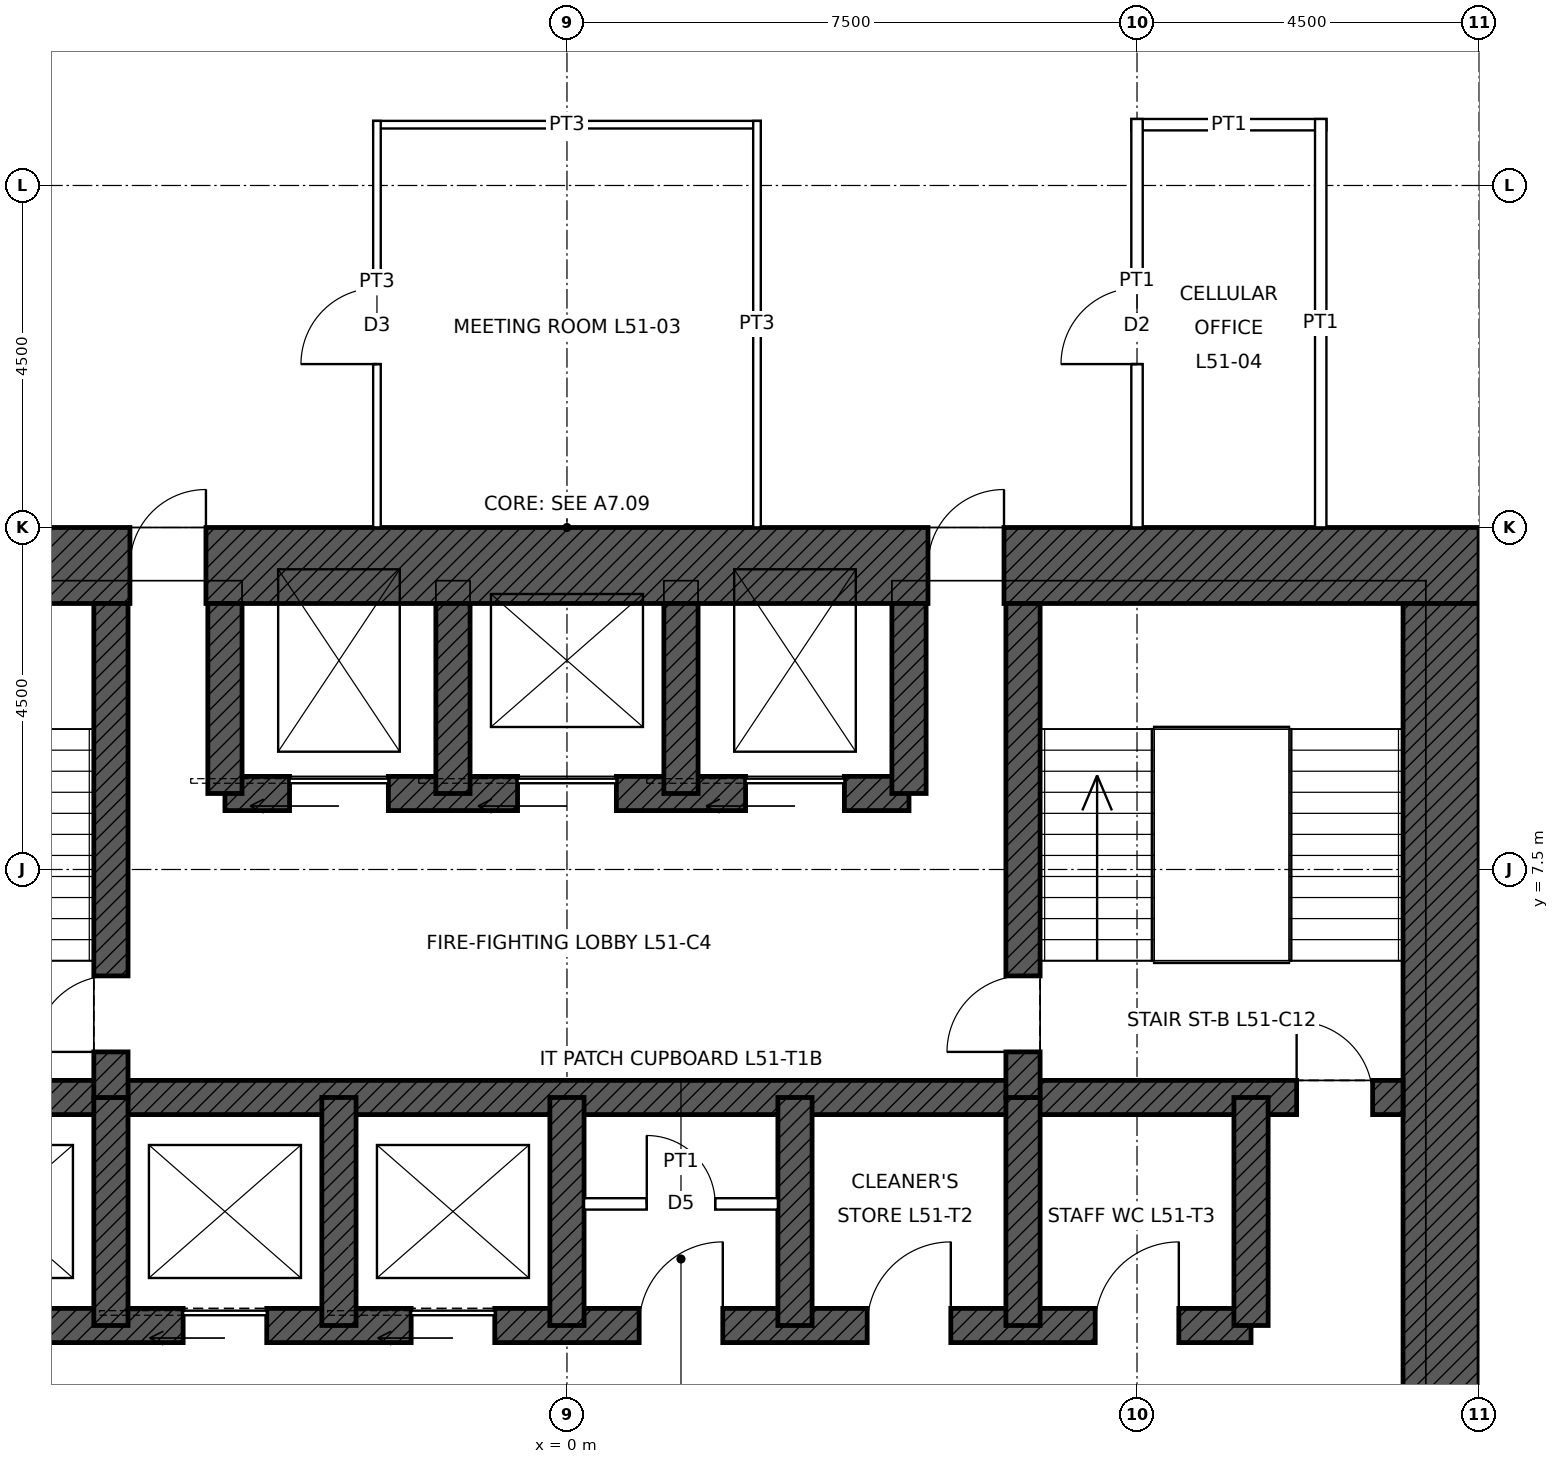
"""IFC4 building model, lengths in metres.
Left out: names, types, materials, properties, quantities, classifications, styles, units other than length and angle.
Written with IfcOpenShell. Run it as: python <this file> out.ifc"""

import sys

from ifc_helpers import new_model, si_unit, direction, frame, frame_2d, origin, place, context, subcontext, project, spatial, rectangle, extrude, element, fill, save


model = new_model("IFC4")
c1 = context("Model", 3, precision=1e-05, world=origin(), true_north=direction((0.0, 1.0)))
c2 = subcontext(c1, "Body", "Model", "MODEL_VIEW")
j1 = project(units=[si_unit("LENGTHUNIT", "METRE"), si_unit("PLANEANGLEUNIT", "RADIAN")], contexts=[c1])
p1 = place(None, origin())
s1 = spatial("IfcSite", under=j1, at=p1, CompositionType="ELEMENT")
p2 = place(p1, origin())
s2 = spatial("IfcBuilding", under=s1, at=p2, CompositionType="ELEMENT")
p3 = place(p2, frame((0.0, 0.0, 237.9)))
s3 = spatial("IfcBuildingStorey", under=s2, at=p3, CompositionType="ELEMENT", Elevation=237.9)
p4 = place(p3, frame((-12.0, 11.5, 0.0), z_axis=(0.0, 0.0, 1.0), x_axis=(1.0, 0.0, 0.0)))
e1 = element("IfcWall", 1, at=p4, inside=s3, PredefinedType="SHEAR", context=c2, shape_type="SweptSolid", body=[
    extrude(rectangle(XDim=24.0, YDim=1.0, at=frame_2d((12.0, 0.0))), origin(), (0.0, 0.0, 1.0), 4.0),
])
p5 = place(p4, frame((6.25, 0.0, 0.0)))
e2 = element("IfcOpeningElement", 2, at=p5, cuts=e1, PredefinedType="OPENING", context=c2, shape_type="SweptSolid", body=[
    extrude(rectangle(XDim=1.0, YDim=2.4, at=frame_2d((0.5, 1.2))), frame((0.0, 0.51, 0.0), z_axis=(0.0, -1.0, 0.0), x_axis=(1.0, 0.0, 0.0)), (0.0, 0.0, 1.0), 1.02),
])
p6 = place(p4, frame((16.75, 0.0, 0.0)))
e3 = element("IfcOpeningElement", 3, at=p6, cuts=e1, PredefinedType="OPENING", context=c2, shape_type="SweptSolid", body=[
    extrude(rectangle(XDim=1.0, YDim=2.4, at=frame_2d((0.5, 1.2))), frame((0.0, 0.51, 0.0), z_axis=(0.0, -1.0, 0.0), x_axis=(1.0, 0.0, 0.0)), (0.0, 0.0, 1.0), 1.02),
])
p7 = place(p3, frame((11.5, 11.0, 0.0), z_axis=(0.0, 0.0, 1.0), x_axis=(0.0, -1.0, 0.0)))
e4 = element("IfcWall", 4, at=p7, inside=s3, PredefinedType="SHEAR", context=c2, shape_type="SweptSolid", body=[
    extrude(rectangle(XDim=22.0, YDim=1.0, at=frame_2d((11.0, 0.0))), origin(), (0.0, 0.0, 1.0), 4.0),
])
p8 = place(p7, frame((10.5, 0.0, 0.0)))
e5 = element("IfcOpeningElement", 5, at=p8, cuts=e4, PredefinedType="OPENING", context=c2, shape_type="SweptSolid", body=[
    extrude(rectangle(XDim=1.0, YDim=2.4, at=frame_2d((0.5, 1.2))), frame((0.0, 0.51, 0.0), z_axis=(0.0, -1.0, 0.0), x_axis=(1.0, 0.0, 0.0)), (0.0, 0.0, 1.0), 1.02),
])
p9 = place(p3, frame((-11.0, 4.5, 0.0), z_axis=(0.0, 0.0, 1.0), x_axis=(1.0, 0.0, 0.0)))
e6 = element("IfcWall", 6, at=p9, inside=s3, PredefinedType="SHEAR", context=c2, shape_type="SweptSolid", body=[
    extrude(rectangle(XDim=22.0, YDim=0.45, at=frame_2d((11.0, 0.0))), origin(), (0.0, 0.0, 1.0), 4.0),
])
p10 = place(p9, frame((0.4, 0.0, 0.0)))
e7 = element("IfcOpeningElement", 7, at=p10, cuts=e6, PredefinedType="OPENING", context=c2, shape_type="SweptSolid", body=[
    extrude(rectangle(XDim=1.0, YDim=2.1, at=frame_2d((0.5, 1.05))), frame((0.0, 0.235, 0.0), z_axis=(0.0, -1.0, 0.0), x_axis=(1.0, 0.0, 0.0)), (0.0, 0.0, 1.0), 0.47),
])
p11 = place(p9, frame((20.6, 0.0, 0.0)))
e8 = element("IfcOpeningElement", 8, at=p11, cuts=e6, PredefinedType="OPENING", context=c2, shape_type="SweptSolid", body=[
    extrude(rectangle(XDim=1.0, YDim=2.1, at=frame_2d((0.5, 1.05))), frame((0.0, 0.235, 0.0), z_axis=(0.0, -1.0, 0.0), x_axis=(1.0, 0.0, 0.0)), (0.0, 0.0, 1.0), 0.47),
])
p12 = place(p3, frame((-9.0, 1.5, 0.0), z_axis=(0.0, 0.0, 1.0), x_axis=(1.0, 0.0, 0.0)))
e9 = element("IfcWall", 9, at=p12, inside=s3, PredefinedType="SHEAR", context=c2, shape_type="SweptSolid", body=[
    extrude(rectangle(XDim=18.0, YDim=0.45, at=frame_2d((9.0, 0.0))), origin(), (0.0, 0.0, 1.0), 4.0),
])
p13 = place(p12, frame((0.95, 0.0, 0.0)))
e10 = element("IfcOpeningElement", 10, at=p13, cuts=e9, PredefinedType="OPENING", context=c2, shape_type="SweptSolid", body=[
    extrude(rectangle(XDim=1.1, YDim=2.1, at=frame_2d((0.55, 1.05))), frame((0.0, 0.235, 0.0), z_axis=(0.0, -1.0, 0.0), x_axis=(1.0, 0.0, 0.0)), (0.0, 0.0, 1.0), 0.47),
])
p14 = place(p12, frame((3.95, 0.0, 0.0)))
e11 = element("IfcOpeningElement", 11, at=p14, cuts=e9, PredefinedType="OPENING", context=c2, shape_type="SweptSolid", body=[
    extrude(rectangle(XDim=1.1, YDim=2.1, at=frame_2d((0.55, 1.05))), frame((0.0, 0.235, 0.0), z_axis=(0.0, -1.0, 0.0), x_axis=(1.0, 0.0, 0.0)), (0.0, 0.0, 1.0), 0.47),
])
p15 = place(p12, frame((6.95, 0.0, 0.0)))
e12 = element("IfcOpeningElement", 12, at=p15, cuts=e9, PredefinedType="OPENING", context=c2, shape_type="SweptSolid", body=[
    extrude(rectangle(XDim=1.1, YDim=2.1, at=frame_2d((0.55, 1.05))), frame((0.0, 0.235, 0.0), z_axis=(0.0, -1.0, 0.0), x_axis=(1.0, 0.0, 0.0)), (0.0, 0.0, 1.0), 0.47),
])
p16 = place(p12, frame((9.95, 0.0, 0.0)))
e13 = element("IfcOpeningElement", 13, at=p16, cuts=e9, PredefinedType="OPENING", context=c2, shape_type="SweptSolid", body=[
    extrude(rectangle(XDim=1.1, YDim=2.1, at=frame_2d((0.55, 1.05))), frame((0.0, 0.235, 0.0), z_axis=(0.0, -1.0, 0.0), x_axis=(1.0, 0.0, 0.0)), (0.0, 0.0, 1.0), 0.47),
])
p17 = place(p12, frame((12.95, 0.0, 0.0)))
e14 = element("IfcOpeningElement", 14, at=p17, cuts=e9, PredefinedType="OPENING", context=c2, shape_type="SweptSolid", body=[
    extrude(rectangle(XDim=1.1, YDim=2.1, at=frame_2d((0.55, 1.05))), frame((0.0, 0.235, 0.0), z_axis=(0.0, -1.0, 0.0), x_axis=(1.0, 0.0, 0.0)), (0.0, 0.0, 1.0), 0.47),
])
p18 = place(p12, frame((15.95, 0.0, 0.0)))
e15 = element("IfcOpeningElement", 15, at=p18, cuts=e9, PredefinedType="OPENING", context=c2, shape_type="SweptSolid", body=[
    extrude(rectangle(XDim=1.1, YDim=2.1, at=frame_2d((0.55, 1.05))), frame((0.0, 0.235, 0.0), z_axis=(0.0, -1.0, 0.0), x_axis=(1.0, 0.0, 0.0)), (0.0, 0.0, 1.0), 0.47),
])
p19 = place(p3, frame((-4.5, 8.5, 0.0), z_axis=(0.0, 0.0, 1.0), x_axis=(1.0, 0.0, 0.0)))
e16 = element("IfcWall", 16, at=p19, inside=s3, PredefinedType="SHEAR", context=c2, shape_type="SweptSolid", body=[
    extrude(rectangle(XDim=9.0, YDim=0.45, at=frame_2d((4.5, 0.0))), origin(), (0.0, 0.0, 1.0), 4.0),
])
p20 = place(p19, frame((0.85, 0.0, 0.0)))
e17 = element("IfcOpeningElement", 17, at=p20, cuts=e16, PredefinedType="OPENING", context=c2, shape_type="SweptSolid", body=[
    extrude(rectangle(XDim=1.3, YDim=2.4, at=frame_2d((0.65, 1.2))), frame((0.0, 0.235, 0.0), z_axis=(0.0, -1.0, 0.0), x_axis=(1.0, 0.0, 0.0)), (0.0, 0.0, 1.0), 0.47),
])
p21 = place(p19, frame((6.85, 0.0, 0.0)))
e18 = element("IfcOpeningElement", 18, at=p21, cuts=e16, PredefinedType="OPENING", context=c2, shape_type="SweptSolid", body=[
    extrude(rectangle(XDim=1.3, YDim=2.4, at=frame_2d((0.65, 1.2))), frame((0.0, 0.235, 0.0), z_axis=(0.0, -1.0, 0.0), x_axis=(1.0, 0.0, 0.0)), (0.0, 0.0, 1.0), 0.47),
])
p22 = place(p19, frame((3.85, 0.0, 0.0)))
e19 = element("IfcOpeningElement", 19, at=p22, cuts=e16, PredefinedType="OPENING", context=c2, shape_type="SweptSolid", body=[
    extrude(rectangle(XDim=1.3, YDim=2.4, at=frame_2d((0.65, 1.2))), frame((0.0, 0.235, 0.0), z_axis=(0.0, -1.0, 0.0), x_axis=(1.0, 0.0, 0.0)), (0.0, 0.0, 1.0), 0.47),
])
for number, where, z_axis, x_axis in (
    (20, (9.0, 1.5, 0.0), (0.0, 0.0, 1.0), (0.0, 1.0, 0.0)),
    (21, (-6.0, 1.5, 0.0), (0.0, 0.0, 1.0), (0.0, 1.0, 0.0)),
    (22, (-3.0, 1.5, 0.0), (0.0, 0.0, 1.0), (0.0, 1.0, 0.0)),
    (23, (0.0, 1.5, 0.0), (0.0, 0.0, 1.0), (0.0, 1.0, 0.0)),
    (24, (3.0, 1.5, 0.0), (0.0, 0.0, 1.0), (0.0, 1.0, 0.0)),
    (25, (6.0, 1.5, 0.0), (0.0, 0.0, 1.0), (0.0, 1.0, 0.0)),
):
    element("IfcWall", number, at=place(p3, frame(where, z_axis=z_axis, x_axis=x_axis)), inside=s3, PredefinedType="SHEAR", context=c2, shape_type="SweptSolid", body=[
        extrude(rectangle(XDim=3.0, YDim=0.45, at=frame_2d((1.5, 0.0))), origin(), (0.0, 0.0, 1.0), 4.0),
    ])
p23 = place(p3, frame((-6.0, 4.5, 0.0), z_axis=(0.0, 0.0, 1.0), x_axis=(0.0, 1.0, 0.0)))
e26 = element("IfcWall", 26, at=p23, inside=s3, PredefinedType="SHEAR", context=c2, shape_type="SweptSolid", body=[
    extrude(rectangle(XDim=6.5, YDim=0.45, at=frame_2d((3.25, 0.0))), origin(), (0.0, 0.0, 1.0), 4.0),
])
p24 = place(p23, frame((0.6, 0.0, 0.0)))
e27 = element("IfcOpeningElement", 27, at=p24, cuts=e26, PredefinedType="OPENING", context=c2, shape_type="SweptSolid", body=[
    extrude(rectangle(XDim=1.0, YDim=2.1, at=frame_2d((0.5, 1.05))), frame((0.0, 0.235, 0.0), z_axis=(0.0, -1.0, 0.0), x_axis=(1.0, 0.0, 0.0)), (0.0, 0.0, 1.0), 0.47),
])
p25 = place(p3, frame((6.0, 4.5, 0.0), z_axis=(0.0, 0.0, 1.0), x_axis=(0.0, 1.0, 0.0)))
e28 = element("IfcWall", 28, at=p25, inside=s3, PredefinedType="SHEAR", context=c2, shape_type="SweptSolid", body=[
    extrude(rectangle(XDim=6.5, YDim=0.45, at=frame_2d((3.25, 0.0))), origin(), (0.0, 0.0, 1.0), 4.0),
])
p26 = place(p25, frame((0.6, 0.0, 0.0)))
e29 = element("IfcOpeningElement", 29, at=p26, cuts=e28, PredefinedType="OPENING", context=c2, shape_type="SweptSolid", body=[
    extrude(rectangle(XDim=1.0, YDim=2.1, at=frame_2d((0.5, 1.05))), frame((0.0, 0.235, 0.0), z_axis=(0.0, -1.0, 0.0), x_axis=(1.0, 0.0, 0.0)), (0.0, 0.0, 1.0), 0.47),
])
for number, where, z_axis, x_axis in (
    (30, (-4.5, 8.5, 0.0), (0.0, 0.0, 1.0), (0.0, 1.0, 0.0)),
    (31, (4.5, 8.5, 0.0), (0.0, 0.0, 1.0), (0.0, 1.0, 0.0)),
    (32, (-1.5, 8.5, 0.0), (0.0, 0.0, 1.0), (0.0, 1.0, 0.0)),
    (33, (1.5, 8.5, 0.0), (0.0, 0.0, 1.0), (0.0, 1.0, 0.0)),
):
    element("IfcWall", number, at=place(p3, frame(where, z_axis=z_axis, x_axis=x_axis)), inside=s3, PredefinedType="SHEAR", context=c2, shape_type="SweptSolid", body=[
        extrude(rectangle(XDim=2.5, YDim=0.45, at=frame_2d((1.25, 0.0))), origin(), (0.0, 0.0, 1.0), 4.0),
    ])
p27 = place(p3, frame((-2.55, 17.3, 0.0), z_axis=(0.0, 0.0, 1.0), x_axis=(1.0, 0.0, 0.0)))
e34 = element("IfcWall", 34, at=p27, inside=s3, PredefinedType="PARTITIONING", context=c2, shape_type="SweptSolid", body=[
    extrude(rectangle(XDim=5.1, YDim=0.1, at=frame_2d((2.55, 0.0))), origin(), (0.0, 0.0, 1.0), 3.85),
])
p28 = place(p3, frame((7.425, 17.3, 0.0), z_axis=(0.0, 0.0, 1.0), x_axis=(1.0, 0.0, 0.0)))
e35 = element("IfcWall", 35, at=p28, inside=s3, PredefinedType="PARTITIONING", context=c2, shape_type="SweptSolid", body=[
    extrude(rectangle(XDim=2.567, YDim=0.15, at=frame_2d((1.283, 0.0))), origin(), (0.0, 0.0, 1.0), 3.85),
])
p29 = place(p3, frame((-2.5, 12.0, 0.0), z_axis=(0.0, 0.0, 1.0), x_axis=(0.0, 1.0, 0.0)))
e36 = element("IfcWall", 36, at=p29, inside=s3, PredefinedType="PARTITIONING", context=c2, shape_type="SweptSolid", body=[
    extrude(rectangle(XDim=5.35, YDim=0.1, at=frame_2d((2.675, 0.0))), origin(), (0.0, 0.0, 1.0), 3.85),
])
p30 = place(p29, frame((2.15, 0.0, 0.0)))
e37 = element("IfcOpeningElement", 37, at=p30, cuts=e36, PredefinedType="OPENING", context=c2, shape_type="SweptSolid", body=[
    extrude(rectangle(XDim=1.0, YDim=2.1, at=frame_2d((0.5, 1.05))), frame((0.0, 0.06, 0.0), z_axis=(0.0, -1.0, 0.0), x_axis=(1.0, 0.0, 0.0)), (0.0, 0.0, 1.0), 0.12),
])
p31 = place(p3, frame((2.5, 12.0, 0.0), z_axis=(0.0, 0.0, 1.0), x_axis=(0.0, 1.0, 0.0)))
e38 = element("IfcWall", 38, at=p31, inside=s3, PredefinedType="PARTITIONING", context=c2, shape_type="SweptSolid", body=[
    extrude(rectangle(XDim=5.35, YDim=0.1, at=frame_2d((2.675, 0.0))), origin(), (0.0, 0.0, 1.0), 3.85),
])
p32 = place(p3, frame((7.5, 12.0, 0.0), z_axis=(0.0, 0.0, 1.0), x_axis=(0.0, 1.0, 0.0)))
e39 = element("IfcWall", 39, at=p32, inside=s3, PredefinedType="PARTITIONING", context=c2, shape_type="SweptSolid", body=[
    extrude(rectangle(XDim=5.375, YDim=0.15, at=frame_2d((2.688, 0.0))), origin(), (0.0, 0.0, 1.0), 3.238),
])
p33 = place(p32, frame((2.15, 0.0, 0.0)))
e40 = element("IfcOpeningElement", 40, at=p33, cuts=e39, PredefinedType="OPENING", context=c2, shape_type="SweptSolid", body=[
    extrude(rectangle(XDim=1.0, YDim=2.1, at=frame_2d((0.5, 1.05))), frame((0.0, 0.085, 0.0), z_axis=(0.0, -1.0, 0.0), x_axis=(1.0, 0.0, 0.0)), (0.0, 0.0, 1.0), 0.17),
])
p34 = place(p3, frame((9.917, 12.0, 0.0), z_axis=(0.0, 0.0, 1.0), x_axis=(0.0, 1.0, 0.0)))
e41 = element("IfcWall", 41, at=p34, inside=s3, PredefinedType="PARTITIONING", context=c2, shape_type="SweptSolid", body=[
    extrude(rectangle(XDim=5.375, YDim=0.15, at=frame_2d((2.688, 0.0))), origin(), (0.0, 0.0, 1.0), 3.85),
])
p35 = place(p3, frame((0.225, 3.1, 0.0), z_axis=(0.0, 0.0, 1.0), x_axis=(1.0, 0.0, 0.0)))
e42 = element("IfcWall", 42, at=p35, inside=s3, PredefinedType="PARTITIONING", context=c2, shape_type="SweptSolid", body=[
    extrude(rectangle(XDim=2.55, YDim=0.15, at=frame_2d((1.275, 0.0))), origin(), (0.0, 0.0, 1.0), 3.75),
])
p36 = place(p35, frame((0.825, 0.0, 0.0)))
e43 = element("IfcOpeningElement", 43, at=p36, cuts=e42, PredefinedType="OPENING", context=c2, shape_type="SweptSolid", body=[
    extrude(rectangle(XDim=0.9, YDim=2.1, at=frame_2d((0.45, 1.05))), frame((0.0, 0.085, 0.0), z_axis=(0.0, -1.0, 0.0), x_axis=(1.0, 0.0, 0.0)), (0.0, 0.0, 1.0), 0.17),
])
p37 = place(p11, origin())
e44 = element("IfcDoor", 44, at=p37, inside=s3, OperationType="SINGLE_SWING_LEFT", PredefinedType="DOOR", context=c2, shape_type="SweptSolid", body=[
    extrude(rectangle(XDim=1.0, YDim=2.1, at=frame_2d((0.5, 1.05))), frame((0.0, 0.025, 0.0), z_axis=(0.0, -1.0, 0.0), x_axis=(1.0, 0.0, 0.0)), (0.0, 0.0, 1.0), 0.05),
])
fill(e8, e44)
p38 = place(p24, origin())
e45 = element("IfcDoor", 45, at=p38, inside=s3, OperationType="SINGLE_SWING_LEFT", PredefinedType="DOOR", context=c2, shape_type="SweptSolid", body=[
    extrude(rectangle(XDim=1.0, YDim=2.1, at=frame_2d((0.5, 1.05))), frame((0.0, 0.025, 0.0), z_axis=(0.0, -1.0, 0.0), x_axis=(1.0, 0.0, 0.0)), (0.0, 0.0, 1.0), 0.05),
])
fill(e27, e45)
p39 = place(p26, origin())
e46 = element("IfcDoor", 46, at=p39, inside=s3, OperationType="SINGLE_SWING_LEFT", PredefinedType="DOOR", context=c2, shape_type="SweptSolid", body=[
    extrude(rectangle(XDim=1.0, YDim=2.1, at=frame_2d((0.5, 1.05))), frame((0.0, 0.025, 0.0), z_axis=(0.0, -1.0, 0.0), x_axis=(1.0, 0.0, 0.0)), (0.0, 0.0, 1.0), 0.05),
])
fill(e29, e46)
p40 = place(p5, origin())
e47 = element("IfcDoor", 47, at=p40, inside=s3, OperationType="SINGLE_SWING_RIGHT", PredefinedType="DOOR", context=c2, shape_type="SweptSolid", body=[
    extrude(rectangle(XDim=1.0, YDim=2.4, at=frame_2d((0.5, 1.2))), frame((0.0, 0.485, 0.0), z_axis=(0.0, -1.0, 0.0), x_axis=(1.0, 0.0, 0.0)), (0.0, 0.0, 1.0), 0.05),
])
fill(e2, e47)
p41 = place(p6, origin())
e48 = element("IfcDoor", 48, at=p41, inside=s3, OperationType="SINGLE_SWING_RIGHT", PredefinedType="DOOR", context=c2, shape_type="SweptSolid", body=[
    extrude(rectangle(XDim=1.0, YDim=2.4, at=frame_2d((0.5, 1.2))), frame((0.0, 0.485, 0.0), z_axis=(0.0, -1.0, 0.0), x_axis=(1.0, 0.0, 0.0)), (0.0, 0.0, 1.0), 0.05),
])
fill(e3, e48)
p42 = place(p20, origin())
e49 = element("IfcDoor", 49, at=p42, inside=s3, OperationType="SLIDING_TO_LEFT", PredefinedType="DOOR", context=c2, shape_type="SweptSolid", body=[
    extrude(rectangle(XDim=1.3, YDim=2.4, at=frame_2d((0.65, 1.2))), frame((0.0, 0.025, 0.0), z_axis=(0.0, -1.0, 0.0), x_axis=(1.0, 0.0, 0.0)), (0.0, 0.0, 1.0), 0.05),
])
fill(e17, e49)
p43 = place(p21, origin())
e50 = element("IfcDoor", 50, at=p43, inside=s3, OperationType="SLIDING_TO_LEFT", PredefinedType="DOOR", context=c2, shape_type="SweptSolid", body=[
    extrude(rectangle(XDim=1.3, YDim=2.4, at=frame_2d((0.65, 1.2))), frame((0.0, 0.025, 0.0), z_axis=(0.0, -1.0, 0.0), x_axis=(1.0, 0.0, 0.0)), (0.0, 0.0, 1.0), 0.05),
])
fill(e18, e50)
p44 = place(p22, origin())
e51 = element("IfcDoor", 51, at=p44, inside=s3, OperationType="SLIDING_TO_LEFT", PredefinedType="DOOR", context=c2, shape_type="SweptSolid", body=[
    extrude(rectangle(XDim=1.3, YDim=2.4, at=frame_2d((0.65, 1.2))), frame((0.0, 0.025, 0.0), z_axis=(0.0, -1.0, 0.0), x_axis=(1.0, 0.0, 0.0)), (0.0, 0.0, 1.0), 0.05),
])
fill(e19, e51)
p45 = place(p14, origin())
e52 = element("IfcDoor", 52, at=p45, inside=s3, OperationType="SLIDING_TO_LEFT", PredefinedType="DOOR", context=c2, shape_type="SweptSolid", body=[
    extrude(rectangle(XDim=1.1, YDim=2.1, at=frame_2d((0.55, 1.05))), frame((0.0, 0.025, 0.0), z_axis=(0.0, -1.0, 0.0), x_axis=(1.0, 0.0, 0.0)), (0.0, 0.0, 1.0), 0.05),
])
fill(e11, e52)
p46 = place(p15, origin())
e53 = element("IfcDoor", 53, at=p46, inside=s3, OperationType="SLIDING_TO_LEFT", PredefinedType="DOOR", context=c2, shape_type="SweptSolid", body=[
    extrude(rectangle(XDim=1.1, YDim=2.1, at=frame_2d((0.55, 1.05))), frame((0.0, 0.025, 0.0), z_axis=(0.0, -1.0, 0.0), x_axis=(1.0, 0.0, 0.0)), (0.0, 0.0, 1.0), 0.05),
])
fill(e12, e53)
p47 = place(p16, origin())
e54 = element("IfcDoor", 54, at=p47, inside=s3, OperationType="SINGLE_SWING_RIGHT", PredefinedType="DOOR", context=c2, shape_type="SweptSolid", body=[
    extrude(rectangle(XDim=1.1, YDim=2.1, at=frame_2d((0.55, 1.05))), frame((0.0, 0.025, 0.0), z_axis=(0.0, -1.0, 0.0), x_axis=(1.0, 0.0, 0.0)), (0.0, 0.0, 1.0), 0.05),
])
fill(e13, e54)
p48 = place(p36, origin())
e55 = element("IfcDoor", 55, at=p48, inside=s3, OperationType="SINGLE_SWING_LEFT", PredefinedType="DOOR", context=c2, shape_type="SweptSolid", body=[
    extrude(rectangle(XDim=0.9, YDim=2.1, at=frame_2d((0.45, 1.05))), frame((0.0, 0.025, 0.0), z_axis=(0.0, -1.0, 0.0), x_axis=(1.0, 0.0, 0.0)), (0.0, 0.0, 1.0), 0.05),
])
fill(e43, e55)
p49 = place(p17, origin())
e56 = element("IfcDoor", 56, at=p49, inside=s3, OperationType="SINGLE_SWING_RIGHT", PredefinedType="DOOR", context=c2, shape_type="SweptSolid", body=[
    extrude(rectangle(XDim=1.1, YDim=2.1, at=frame_2d((0.55, 1.05))), frame((0.0, 0.025, 0.0), z_axis=(0.0, -1.0, 0.0), x_axis=(1.0, 0.0, 0.0)), (0.0, 0.0, 1.0), 0.05),
])
fill(e14, e56)
p50 = place(p18, origin())
e57 = element("IfcDoor", 57, at=p50, inside=s3, OperationType="SINGLE_SWING_RIGHT", PredefinedType="DOOR", context=c2, shape_type="SweptSolid", body=[
    extrude(rectangle(XDim=1.1, YDim=2.1, at=frame_2d((0.55, 1.05))), frame((0.0, 0.025, 0.0), z_axis=(0.0, -1.0, 0.0), x_axis=(1.0, 0.0, 0.0)), (0.0, 0.0, 1.0), 0.05),
])
fill(e15, e57)
p51 = place(p30, origin())
e58 = element("IfcDoor", 58, at=p51, inside=s3, OperationType="SINGLE_SWING_LEFT", PredefinedType="DOOR", context=c2, shape_type="SweptSolid", body=[
    extrude(rectangle(XDim=1.0, YDim=2.1, at=frame_2d((0.5, 1.05))), frame((0.0, 0.025, 0.0), z_axis=(0.0, -1.0, 0.0), x_axis=(1.0, 0.0, 0.0)), (0.0, 0.0, 1.0), 0.05),
])
fill(e37, e58)
p52 = place(p33, origin())
e59 = element("IfcDoor", 59, at=p52, inside=s3, OperationType="SINGLE_SWING_LEFT", PredefinedType="DOOR", context=c2, shape_type="SweptSolid", body=[
    extrude(rectangle(XDim=1.0, YDim=2.1, at=frame_2d((0.5, 1.05))), frame((0.0, 0.025, 0.0), z_axis=(0.0, -1.0, 0.0), x_axis=(1.0, 0.0, 0.0)), (0.0, 0.0, 1.0), 0.05),
])
fill(e40, e59)
save(model, sys.argv[1])
